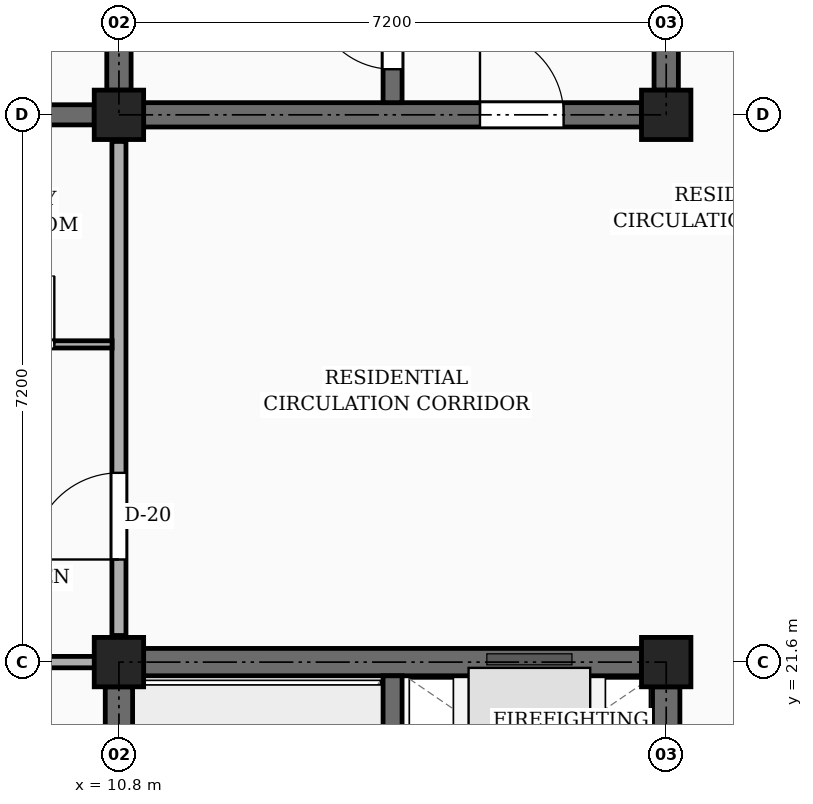
"""IFC4 building model, lengths in metres.
Left out: names, types, materials, properties, quantities, classifications, styles, units other than length and angle.
Written with IfcOpenShell. Run it as: python <this file> out.ifc"""

import sys

from ifc_helpers import new_model, si_unit, direction, frame, frame_2d, origin, origin_2d, place, context, subcontext, project, spatial, rectangle, extrude, element, fill, save


model = new_model("IFC4")
c1 = context("Model", 3, precision=1e-05, world=origin(), true_north=direction((0.0, 1.0)))
c2 = subcontext(c1, "Body", "Model", "MODEL_VIEW")
j1 = project(units=[si_unit("LENGTHUNIT", "METRE"), si_unit("PLANEANGLEUNIT", "RADIAN")], contexts=[c1])
p1 = place(None, origin())
s1 = spatial("IfcSite", under=j1, at=p1, CompositionType="ELEMENT")
p2 = place(p1, origin())
s2 = spatial("IfcBuilding", under=s1, at=p2, CompositionType="ELEMENT")
p3 = place(p2, origin())
s3 = spatial("IfcBuildingStorey", under=s2, at=p3, CompositionType="ELEMENT", Elevation=0.0)
for number, where, z_axis, x_axis in (
    (1, (10.8, 21.6, 0.0), (0.0, 0.0, 1.0), (1.0, 0.0, 0.0)),
    (2, (10.8, 28.8, 0.0), (0.0, 0.0, 1.0), (1.0, 0.0, 0.0)),
    (3, (18.0, 21.6, 0.0), (0.0, 0.0, 1.0), (1.0, 0.0, 0.0)),
    (4, (18.0, 28.8, 0.0), (0.0, 0.0, 1.0), (1.0, 0.0, 0.0)),
):
    element("IfcColumn", number, at=place(p3, frame(where, z_axis=z_axis, x_axis=x_axis)), inside=s3, PredefinedType="COLUMN", context=c2, shape_type="SweptSolid", body=[
        extrude(rectangle(XDim=0.65, YDim=0.65, at=origin_2d()), origin(), (0.0, 0.0, 1.0), 4.5),
    ])
p4 = place(p3, frame((3.9, 28.8, 0.0), z_axis=(0.0, 0.0, 1.0), x_axis=(1.0, 0.0, 0.0)))
e5 = element("IfcWall", 5, at=p4, inside=s3, PredefinedType="SOLIDWALL", context=c2, shape_type="SweptSolid", body=[
    extrude(rectangle(XDim=6.575, YDim=0.265, at=frame_2d((3.288, 0.0))), origin(), (0.0, 0.0, 1.0), 3.52),
])
p5 = place(p4, frame((1.35, 0.0, 0.0)))
e6 = element("IfcOpeningElement", 6, at=p5, cuts=e5, PredefinedType="OPENING", context=c2, shape_type="SweptSolid", body=[
    extrude(rectangle(XDim=0.98, YDim=2.12, at=frame_2d((0.49, 1.06))), frame((0.0, 0.143, 0.0), z_axis=(0.0, -1.0, 0.0), x_axis=(1.0, 0.0, 0.0)), (0.0, 0.0, 1.0), 0.285),
])
p6 = place(p3, frame((10.8, 14.725, 0.0), z_axis=(0.0, 0.0, 1.0), x_axis=(0.0, 1.0, 0.0)))
e7 = element("IfcWall", 7, at=p6, inside=s3, PredefinedType="SHEAR", context=c2, shape_type="SweptSolid", body=[
    extrude(rectangle(XDim=6.55, YDim=0.36, at=frame_2d((3.275, 0.0))), origin(), (0.0, 0.0, 1.0), 4.22),
])
p7 = place(p3, frame((11.125, 21.6, 0.0), z_axis=(0.0, 0.0, 1.0), x_axis=(1.0, 0.0, 0.0)))
e8 = element("IfcWall", 8, at=p7, inside=s3, PredefinedType="SHEAR", context=c2, shape_type="SweptSolid", body=[
    extrude(rectangle(XDim=6.55, YDim=0.36, at=frame_2d((3.275, 0.0))), origin(), (0.0, 0.0, 1.0), 4.22),
])
p8 = place(p3, frame((18.0, 14.725, 0.0), z_axis=(0.0, 0.0, 1.0), x_axis=(0.0, 1.0, 0.0)))
e9 = element("IfcWall", 9, at=p8, inside=s3, PredefinedType="SHEAR", context=c2, shape_type="SweptSolid", body=[
    extrude(rectangle(XDim=6.55, YDim=0.36, at=frame_2d((3.275, 0.0))), origin(), (0.0, 0.0, 1.0), 4.22),
])
p9 = place(p8, frame((1.5, 0.0, 0.0)))
e10 = element("IfcOpeningElement", 10, at=p9, cuts=e9, PredefinedType="OPENING", context=c2, shape_type="SweptSolid", body=[
    extrude(rectangle(XDim=1.1, YDim=2.15, at=frame_2d((0.55, 1.075))), frame((0.0, 0.19, 0.0), z_axis=(0.0, -1.0, 0.0), x_axis=(1.0, 0.0, 0.0)), (0.0, 0.0, 1.0), 0.38),
])
p10 = place(p3, frame((14.4, 14.58, 0.0), z_axis=(0.0, 0.0, 1.0), x_axis=(0.0, 1.0, 0.0)))
e11 = element("IfcWall", 11, at=p10, inside=s3, PredefinedType="SHEAR", context=c2, shape_type="SweptSolid", body=[
    extrude(rectangle(XDim=6.84, YDim=0.25, at=frame_2d((3.42, 0.0))), origin(), (0.0, 0.0, 1.0), 4.22),
])
p11 = place(p10, frame((0.42, 0.0, 0.0)))
e12 = element("IfcOpeningElement", 12, at=p11, cuts=e11, PredefinedType="OPENING", context=c2, shape_type="SweptSolid", body=[
    extrude(rectangle(XDim=1.05, YDim=2.15, at=frame_2d((0.525, 1.075))), frame((0.0, 0.135, 0.0), z_axis=(0.0, -1.0, 0.0), x_axis=(1.0, 0.0, 0.0)), (0.0, 0.0, 1.0), 0.27),
])
p12 = place(p3, frame((10.8, 29.125, 0.0), z_axis=(0.0, 0.0, 1.0), x_axis=(0.0, 1.0, 0.0)))
e13 = element("IfcWall", 13, at=p12, inside=s3, PredefinedType="SHEAR", context=c2, shape_type="SweptSolid", body=[
    extrude(rectangle(XDim=6.55, YDim=0.32, at=frame_2d((3.275, 0.0))), origin(), (0.0, 0.0, 1.0), 4.22),
])
p13 = place(p3, frame((18.0, 29.125, 0.0), z_axis=(0.0, 0.0, 1.0), x_axis=(0.0, 1.0, 0.0)))
e14 = element("IfcWall", 14, at=p13, inside=s3, PredefinedType="SHEAR", context=c2, shape_type="SweptSolid", body=[
    extrude(rectangle(XDim=6.55, YDim=0.32, at=frame_2d((3.275, 0.0))), origin(), (0.0, 0.0, 1.0), 4.22),
])
p14 = place(p13, frame((1.5, 0.0, 0.0)))
e15 = element("IfcOpeningElement", 15, at=p14, cuts=e14, PredefinedType="OPENING", context=c2, shape_type="SweptSolid", body=[
    extrude(rectangle(XDim=1.1, YDim=2.15, at=frame_2d((0.55, 1.075))), frame((0.0, 0.17, 0.0), z_axis=(0.0, -1.0, 0.0), x_axis=(1.0, 0.0, 0.0)), (0.0, 0.0, 1.0), 0.34),
])
p15 = place(p3, frame((11.125, 28.8, 0.0), z_axis=(0.0, 0.0, 1.0), x_axis=(1.0, 0.0, 0.0)))
e16 = element("IfcWall", 16, at=p15, inside=s3, PredefinedType="SHEAR", context=c2, shape_type="SweptSolid", body=[
    extrude(rectangle(XDim=6.55, YDim=0.32, at=frame_2d((3.275, 0.0))), origin(), (0.0, 0.0, 1.0), 4.22),
])
p16 = place(p15, frame((4.425, 0.0, 0.0)))
e17 = element("IfcOpeningElement", 17, at=p16, cuts=e16, PredefinedType="OPENING", context=c2, shape_type="SweptSolid", body=[
    extrude(rectangle(XDim=1.1, YDim=2.15, at=frame_2d((0.55, 1.075))), frame((0.0, 0.17, 0.0), z_axis=(0.0, -1.0, 0.0), x_axis=(1.0, 0.0, 0.0)), (0.0, 0.0, 1.0), 0.34),
])
p17 = place(p3, frame((14.4, 28.96, 0.0), z_axis=(0.0, 0.0, 1.0), x_axis=(0.0, 1.0, 0.0)))
e18 = element("IfcWall", 18, at=p17, inside=s3, PredefinedType="SHEAR", context=c2, shape_type="SweptSolid", body=[
    extrude(rectangle(XDim=6.88, YDim=0.25, at=frame_2d((3.44, 0.0))), origin(), (0.0, 0.0, 1.0), 4.22),
])
p18 = place(p17, frame((0.44, 0.0, 0.0)))
e19 = element("IfcOpeningElement", 19, at=p18, cuts=e18, PredefinedType="OPENING", context=c2, shape_type="SweptSolid", body=[
    extrude(rectangle(XDim=1.05, YDim=2.15, at=frame_2d((0.525, 1.075))), frame((0.0, 0.135, 0.0), z_axis=(0.0, -1.0, 0.0), x_axis=(1.0, 0.0, 0.0)), (0.0, 0.0, 1.0), 0.27),
])
p19 = place(p3, frame((10.8, 21.95, 0.0), z_axis=(0.0, 0.0, 1.0), x_axis=(0.0, 1.0, 0.0)))
e20 = element("IfcWall", 20, at=p19, inside=s3, PredefinedType="PARTITIONING", context=c2, shape_type="SweptSolid", body=[
    extrude(rectangle(XDim=6.5, YDim=0.185, at=frame_2d((3.25, 0.0))), origin(), (0.0, 0.0, 1.0), 3.47),
])
p20 = place(p19, frame((1.0, 0.0, 0.0)))
e21 = element("IfcOpeningElement", 21, at=p20, cuts=e20, PredefinedType="OPENING", context=c2, shape_type="SweptSolid", body=[
    extrude(rectangle(XDim=1.14, YDim=2.18, at=frame_2d((0.57, 1.09))), frame((0.0, 0.103, 0.0), z_axis=(0.0, -1.0, 0.0), x_axis=(1.0, 0.0, 0.0)), (0.0, 0.0, 1.0), 0.205),
])
p21 = place(p3, frame((3.775, 21.6, 0.0), z_axis=(0.0, 0.0, 1.0), x_axis=(1.0, 0.0, 0.0)))
e22 = element("IfcWall", 22, at=p21, inside=s3, PredefinedType="PARTITIONING", context=c2, shape_type="SweptSolid", body=[
    extrude(rectangle(XDim=6.885, YDim=0.15, at=frame_2d((3.442, 0.0))), origin(), (0.0, 0.0, 1.0), 3.27),
])
p22 = place(p3, frame((8.29, 25.78, 0.0), z_axis=(0.0, 0.0, 1.0), x_axis=(1.0, 0.0, 0.0)))
e23 = element("IfcWall", 23, at=p22, inside=s3, PredefinedType="PARTITIONING", context=c2, shape_type="SweptSolid", body=[
    extrude(rectangle(XDim=2.42, YDim=0.095, at=frame_2d((1.21, 0.0))), origin(), (0.0, 0.0, 1.0), 3.655),
])
p23 = place(p22, frame((0.76, 0.0, 0.0)))
e24 = element("IfcOpeningElement", 24, at=p23, cuts=e23, PredefinedType="OPENING", context=c2, shape_type="SweptSolid", body=[
    extrude(rectangle(XDim=0.9, YDim=2.05, at=frame_2d((0.45, 1.025))), frame((0.0, 0.058, 0.0), z_axis=(0.0, -1.0, 0.0), x_axis=(1.0, 0.0, 0.0)), (0.0, 0.0, 1.0), 0.115),
])
p24 = place(p16, frame((1.1, 0.0, 0.0), z_axis=(0.0, 0.0, 1.0), x_axis=(-1.0, 0.0, 0.0)))
e25 = element("IfcDoor", 25, at=p24, inside=s3, OperationType="SINGLE_SWING_LEFT", PredefinedType="DOOR", context=c2, shape_type="SweptSolid", body=[
    extrude(rectangle(XDim=1.1, YDim=2.15, at=frame_2d((0.55, 1.075))), frame((0.0, 0.025, 0.0), z_axis=(0.0, -1.0, 0.0), x_axis=(1.0, 0.0, 0.0)), (0.0, 0.0, 1.0), 0.05),
])
fill(e17, e25)
p25 = place(p18, frame((1.05, 0.0, 0.0), z_axis=(0.0, 0.0, 1.0), x_axis=(-1.0, 0.0, 0.0)))
e26 = element("IfcDoor", 26, at=p25, inside=s3, OperationType="SINGLE_SWING_RIGHT", PredefinedType="DOOR", context=c2, shape_type="SweptSolid", body=[
    extrude(rectangle(XDim=1.05, YDim=2.15, at=frame_2d((0.525, 1.075))), frame((0.0, 0.025, 0.0), z_axis=(0.0, -1.0, 0.0), x_axis=(1.0, 0.0, 0.0)), (0.0, 0.0, 1.0), 0.05),
])
fill(e19, e26)
p26 = place(p20, origin())
e27 = element("IfcDoor", 27, at=p26, inside=s3, OperationType="SINGLE_SWING_LEFT", PredefinedType="DOOR", context=c2, shape_type="SweptSolid", body=[
    extrude(rectangle(XDim=1.14, YDim=2.18, at=frame_2d((0.57, 1.09))), frame((0.0, 0.025, 0.0), z_axis=(0.0, -1.0, 0.0), x_axis=(1.0, 0.0, 0.0)), (0.0, 0.0, 1.0), 0.05),
])
fill(e21, e27)
p27 = place(p23, origin())
e28 = element("IfcDoor", 28, at=p27, inside=s3, OperationType="SINGLE_SWING_RIGHT", PredefinedType="DOOR", context=c2, shape_type="SweptSolid", body=[
    extrude(rectangle(XDim=0.9, YDim=2.05, at=frame_2d((0.45, 1.025))), frame((0.0, 0.025, 0.0), z_axis=(0.0, -1.0, 0.0), x_axis=(1.0, 0.0, 0.0)), (0.0, 0.0, 1.0), 0.05),
])
fill(e24, e28)
save(model, sys.argv[1])
